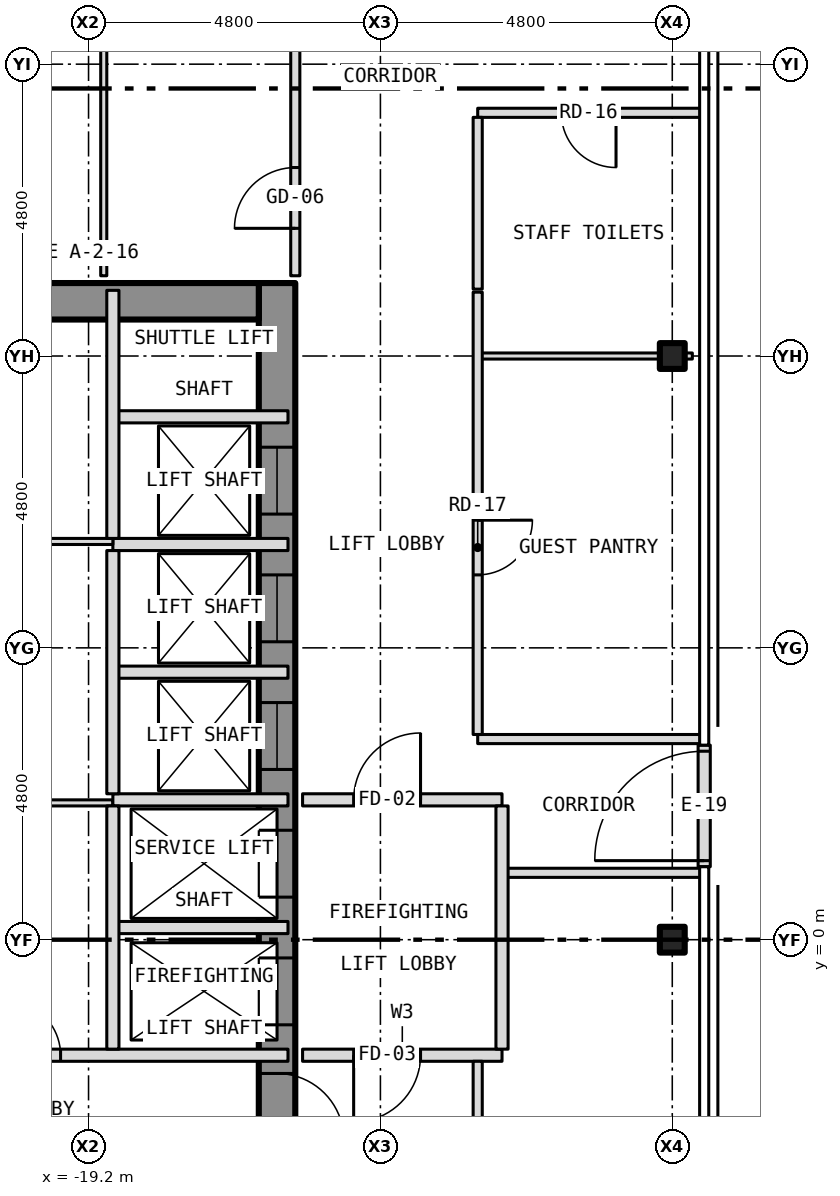
"""IFC4 building model, lengths in metres.
Left out: names, types, materials, properties, quantities, classifications, styles, units other than length and angle.
Written with IfcOpenShell. Run it as: python <this file> out.ifc"""

import sys

from ifc_helpers import new_model, si_unit, direction, frame, frame_2d, origin, origin_2d, place, context, subcontext, project, spatial, rectangle, i_section, extrude, element, fill, save


model = new_model("IFC4")
c1 = context("Model", 3, precision=1e-05, world=origin(), true_north=direction((0.0, 1.0)))
c2 = subcontext(c1, "Body", "Model", "MODEL_VIEW")
j1 = project(units=[si_unit("LENGTHUNIT", "METRE"), si_unit("PLANEANGLEUNIT", "RADIAN")], contexts=[c1])
p1 = place(None, origin())
s1 = spatial("IfcSite", under=j1, at=p1, CompositionType="ELEMENT")
p2 = place(p1, origin())
s2 = spatial("IfcBuilding", under=s1, at=p2, CompositionType="ELEMENT")
p3 = place(p2, frame((0.0, 0.0, 60.0)))
s3 = spatial("IfcBuildingStorey", under=s2, at=p3, CompositionType="ELEMENT", Elevation=60.0)
for number, where, z_axis, x_axis in (
    (1, (-9.6, 0.0, -0.15), (0.0, 0.0, 1.0), (1.0, 0.0, 0.0)),
    (2, (-9.6, 9.6, -0.15), (0.0, 0.0, 1.0), (1.0, 0.0, 0.0)),
):
    element("IfcColumn", number, at=place(p3, frame(where, z_axis=z_axis, x_axis=x_axis)), inside=s3, PredefinedType="COLUMN", context=c2, shape_type="SweptSolid", body=[
        extrude(i_section(OverallWidth=0.409, OverallDepth=0.424, WebThickness=0.033, FlangeThickness=0.052, at=origin_2d()), origin(), (0.0, 0.0, 1.0), 3.5),
    ])
p4 = place(p3, frame((-16.1, -10.8, 0.0), z_axis=(0.0, 0.0, 1.0), x_axis=(0.0, 1.0, 0.0)))
e3 = element("IfcWall", 3, at=p4, inside=s3, PredefinedType="SHEAR", context=c2, shape_type="SweptSolid", body=[
    extrude(rectangle(XDim=21.6, YDim=0.6, at=frame_2d((10.8, 0.0))), origin(), (0.0, 0.0, 1.0), 3.25),
])
p5 = place(p4, frame((9.4, 0.0, 0.0)))
e4 = element("IfcOpeningElement", 4, at=p5, cuts=e3, PredefinedType="OPENING", context=c2, shape_type="SweptSolid", body=[
    extrude(rectangle(XDim=1.1, YDim=2.1, at=frame_2d((0.55, 1.05))), frame((0.0, 0.312, 0.0), z_axis=(0.0, -1.0, 0.0), x_axis=(1.0, 0.0, 0.0)), (0.0, 0.0, 1.0), 0.624),
])
p6 = place(p4, frame((11.5, 0.0, 0.0)))
e5 = element("IfcOpeningElement", 5, at=p6, cuts=e3, PredefinedType="OPENING", context=c2, shape_type="SweptSolid", body=[
    extrude(rectangle(XDim=1.1, YDim=2.1, at=frame_2d((0.55, 1.05))), frame((0.0, 0.312, 0.0), z_axis=(0.0, -1.0, 0.0), x_axis=(1.0, 0.0, 0.0)), (0.0, 0.0, 1.0), 0.624),
])
p7 = place(p4, frame((13.6, 0.0, 0.0)))
e6 = element("IfcOpeningElement", 6, at=p7, cuts=e3, PredefinedType="OPENING", context=c2, shape_type="SweptSolid", body=[
    extrude(rectangle(XDim=1.1, YDim=2.1, at=frame_2d((0.55, 1.05))), frame((0.0, 0.312, 0.0), z_axis=(0.0, -1.0, 0.0), x_axis=(1.0, 0.0, 0.0)), (0.0, 0.0, 1.0), 0.624),
])
p8 = place(p4, frame((15.7, 0.0, 0.0)))
e7 = element("IfcOpeningElement", 7, at=p8, cuts=e3, PredefinedType="OPENING", context=c2, shape_type="SweptSolid", body=[
    extrude(rectangle(XDim=1.1, YDim=2.1, at=frame_2d((0.55, 1.05))), frame((0.0, 0.312, 0.0), z_axis=(0.0, -1.0, 0.0), x_axis=(1.0, 0.0, 0.0)), (0.0, 0.0, 1.0), 0.624),
])
p9 = place(p4, frame((17.8, 0.0, 0.0)))
e8 = element("IfcOpeningElement", 8, at=p9, cuts=e3, PredefinedType="OPENING", context=c2, shape_type="SweptSolid", body=[
    extrude(rectangle(XDim=1.1, YDim=2.1, at=frame_2d((0.55, 1.05))), frame((0.0, 0.312, 0.0), z_axis=(0.0, -1.0, 0.0), x_axis=(1.0, 0.0, 0.0)), (0.0, 0.0, 1.0), 0.624),
])
p10 = place(p4, frame((0.758, 0.0, 0.0)))
e9 = element("IfcOpeningElement", 9, at=p10, cuts=e3, PredefinedType="OPENING", context=c2, shape_type="SweptSolid", body=[
    extrude(rectangle(XDim=1.1, YDim=2.1, at=frame_2d((0.55, 1.05))), frame((0.0, 0.312, 0.0), z_axis=(0.0, -1.0, 0.0), x_axis=(1.0, 0.0, 0.0)), (0.0, 0.0, 1.0), 0.624),
])
p11 = place(p4, frame((7.5, 0.0, 0.0)))
e10 = element("IfcOpeningElement", 10, at=p11, cuts=e3, PredefinedType="OPENING", context=c2, shape_type="SweptSolid", body=[
    extrude(rectangle(XDim=1.1, YDim=2.1, at=frame_2d((0.55, 1.05))), frame((0.0, 0.312, 0.0), z_axis=(0.0, -1.0, 0.0), x_axis=(1.0, 0.0, 0.0)), (0.0, 0.0, 1.0), 0.624),
])
p12 = place(p3, frame((-23.4, 10.5, 0.0), z_axis=(0.0, 0.0, 1.0), x_axis=(1.0, 0.0, 0.0)))
e11 = element("IfcWall", 11, at=p12, inside=s3, PredefinedType="SHEAR", context=c2, shape_type="SweptSolid", body=[
    extrude(rectangle(XDim=7.0, YDim=0.6, at=frame_2d((3.5, 0.0))), origin(), (0.0, 0.0, 1.0), 3.25),
])
p13 = place(p3, frame((-9.075, 1.2, 0.0), z_axis=(0.0, 0.0, 1.0), x_axis=(0.0, 1.0, 0.0)))
e12 = element("IfcWall", 12, at=p13, inside=s3, PredefinedType="SOLIDWALL", context=c2, shape_type="SweptSolid", body=[
    extrude(rectangle(XDim=2.0, YDim=0.2, at=frame_2d((1.0, 0.0))), origin(), (0.0, 0.0, 1.0), 2.593),
])
p14 = place(p13, frame((0.1, 0.0, 0.0)))
e13 = element("IfcOpeningElement", 13, at=p14, cuts=e12, PredefinedType="OPENING", context=c2, shape_type="SweptSolid", body=[
    extrude(rectangle(XDim=1.8, YDim=2.1, at=frame_2d((0.9, 1.05))), frame((0.0, 0.112, 0.0), z_axis=(0.0, -1.0, 0.0), x_axis=(1.0, 0.0, 0.0)), (0.0, 0.0, 1.0), 0.224),
])
p15 = place(p3, frame((-23.88, -1.9, 0.0), z_axis=(0.0, 0.0, 1.0), x_axis=(1.0, 0.0, 0.0)))
e14 = element("IfcWall", 14, at=p15, inside=s3, PredefinedType="PARTITIONING", context=c2, shape_type="SweptSolid", body=[
    extrude(rectangle(XDim=7.96, YDim=0.2, at=frame_2d((3.98, 0.0))), origin(), (0.0, 0.0, 1.0), 3.25),
])
p16 = place(p15, frame((3.32, 0.0, 0.0)))
e15 = element("IfcOpeningElement", 15, at=p16, cuts=e14, PredefinedType="OPENING", context=c2, shape_type="SweptSolid", body=[
    extrude(rectangle(XDim=0.9, YDim=2.1, at=frame_2d((0.45, 1.05))), frame((0.0, 0.112, 0.0), z_axis=(0.0, -1.0, 0.0), x_axis=(1.0, 0.0, 0.0)), (0.0, 0.0, 1.0), 0.224),
])
p17 = place(p3, frame((-15.68, -1.9, 0.0), z_axis=(0.0, 0.0, 1.0), x_axis=(1.0, 0.0, 0.0)))
e16 = element("IfcWall", 16, at=p17, inside=s3, PredefinedType="PARTITIONING", context=c2, shape_type="SweptSolid", body=[
    extrude(rectangle(XDim=3.28, YDim=0.2, at=frame_2d((1.64, 0.0))), origin(), (0.0, 0.0, 1.0), 3.35),
])
p18 = place(p17, frame((0.84, 0.0, 0.0)))
e17 = element("IfcOpeningElement", 17, at=p18, cuts=e16, PredefinedType="OPENING", context=c2, shape_type="SweptSolid", body=[
    extrude(rectangle(XDim=1.1, YDim=2.1, at=frame_2d((0.55, 1.05))), frame((0.0, 0.112, 0.0), z_axis=(0.0, -1.0, 0.0), x_axis=(1.0, 0.0, 0.0)), (0.0, 0.0, 1.0), 0.224),
])
p19 = place(p3, frame((-18.8, 0.2, 0.0), z_axis=(0.0, 0.0, 1.0), x_axis=(1.0, 0.0, 0.0)))
e18 = element("IfcWall", 18, at=p19, inside=s3, PredefinedType="PARTITIONING", context=c2, shape_type="SweptSolid", body=[
    extrude(rectangle(XDim=2.88, YDim=0.2, at=frame_2d((1.44, 0.0))), origin(), (0.0, 0.0, 1.0), 3.25),
])
p20 = place(p3, frame((-12.4, 1.1, 0.0), z_axis=(0.0, 0.0, 1.0), x_axis=(1.0, 0.0, 0.0)))
e19 = element("IfcWall", 19, at=p20, inside=s3, PredefinedType="PARTITIONING", context=c2, shape_type="SweptSolid", body=[
    extrude(rectangle(XDim=3.28, YDim=0.15, at=frame_2d((1.64, 0.0))), origin(), (0.0, 0.0, 1.0), 3.35),
])
p21 = place(p3, frame((-23.88, 2.25, 0.0), z_axis=(0.0, 0.0, 1.0), x_axis=(1.0, 0.0, 0.0)))
e20 = element("IfcWall", 20, at=p21, inside=s3, PredefinedType="PARTITIONING", context=c2, shape_type="SweptSolid", body=[
    extrude(rectangle(XDim=5.08, YDim=0.1, at=frame_2d((2.54, 0.0))), origin(), (0.0, 0.0, 1.0), 3.25),
])
p22 = place(p21, frame((2.03, 0.0, 0.0)))
e21 = element("IfcOpeningElement", 21, at=p22, cuts=e20, PredefinedType="OPENING", context=c2, shape_type="SweptSolid", body=[
    extrude(rectangle(XDim=0.9, YDim=2.1, at=frame_2d((0.45, 1.05))), frame((0.0, 0.062, 0.0), z_axis=(0.0, -1.0, 0.0), x_axis=(1.0, 0.0, 0.0)), (0.0, 0.0, 1.0), 0.124),
])
p23 = place(p3, frame((-18.8, 2.3, 0.0), z_axis=(0.0, 0.0, 1.0), x_axis=(1.0, 0.0, 0.0)))
e22 = element("IfcWall", 22, at=p23, inside=s3, PredefinedType="PARTITIONING", context=c2, shape_type="SweptSolid", body=[
    extrude(rectangle(XDim=2.88, YDim=0.2, at=frame_2d((1.44, 0.0))), origin(), (0.0, 0.0, 1.0), 3.25),
])
p24 = place(p3, frame((-15.68, 2.3, 0.0), z_axis=(0.0, 0.0, 1.0), x_axis=(1.0, 0.0, 0.0)))
e23 = element("IfcWall", 23, at=p24, inside=s3, PredefinedType="PARTITIONING", context=c2, shape_type="SweptSolid", body=[
    extrude(rectangle(XDim=3.28, YDim=0.2, at=frame_2d((1.64, 0.0))), origin(), (0.0, 0.0, 1.0), 3.35),
])
p25 = place(p24, frame((0.84, 0.0, 0.0)))
e24 = element("IfcOpeningElement", 24, at=p25, cuts=e23, PredefinedType="OPENING", context=c2, shape_type="SweptSolid", body=[
    extrude(rectangle(XDim=1.1, YDim=2.1, at=frame_2d((0.55, 1.05))), frame((0.0, 0.112, 0.0), z_axis=(0.0, -1.0, 0.0), x_axis=(1.0, 0.0, 0.0)), (0.0, 0.0, 1.0), 0.224),
])
p26 = place(p3, frame((-12.8, 3.3, 0.0), z_axis=(0.0, 0.0, 1.0), x_axis=(1.0, 0.0, 0.0)))
e25 = element("IfcWall", 25, at=p26, inside=s3, PredefinedType="PARTITIONING", context=c2, shape_type="SweptSolid", body=[
    extrude(rectangle(XDim=3.68, YDim=0.15, at=frame_2d((1.84, 0.0))), origin(), (0.0, 0.0, 1.0), 3.35),
])
for number, where, z_axis, x_axis in (
    (26, (-18.8, 4.4, 0.0), (0.0, 0.0, 1.0), (1.0, 0.0, 0.0)),
    (27, (-18.8, 6.5, 0.0), (0.0, 0.0, 1.0), (1.0, 0.0, 0.0)),
):
    element("IfcWall", number, at=place(p3, frame(where, z_axis=z_axis, x_axis=x_axis)), inside=s3, PredefinedType="PARTITIONING", context=c2, shape_type="SweptSolid", body=[
        extrude(rectangle(XDim=2.88, YDim=0.2, at=frame_2d((1.44, 0.0))), origin(), (0.0, 0.0, 1.0), 3.25),
    ])
p27 = place(p3, frame((-23.88, 6.55, 0.0), z_axis=(0.0, 0.0, 1.0), x_axis=(1.0, 0.0, 0.0)))
e28 = element("IfcWall", 28, at=p27, inside=s3, PredefinedType="PARTITIONING", context=c2, shape_type="SweptSolid", body=[
    extrude(rectangle(XDim=5.08, YDim=0.1, at=frame_2d((2.54, 0.0))), origin(), (0.0, 0.0, 1.0), 3.25),
])
p28 = place(p27, frame((2.03, 0.0, 0.0)))
e29 = element("IfcOpeningElement", 29, at=p28, cuts=e28, PredefinedType="OPENING", context=c2, shape_type="SweptSolid", body=[
    extrude(rectangle(XDim=0.9, YDim=2.1, at=frame_2d((0.45, 1.05))), frame((0.0, 0.062, 0.0), z_axis=(0.0, -1.0, 0.0), x_axis=(1.0, 0.0, 0.0)), (0.0, 0.0, 1.0), 0.124),
])
p29 = place(p3, frame((-18.8, 8.6, 0.0), z_axis=(0.0, 0.0, 1.0), x_axis=(1.0, 0.0, 0.0)))
e30 = element("IfcWall", 30, at=p29, inside=s3, PredefinedType="PARTITIONING", context=c2, shape_type="SweptSolid", body=[
    extrude(rectangle(XDim=2.88, YDim=0.2, at=frame_2d((1.44, 0.0))), origin(), (0.0, 0.0, 1.0), 3.25),
])
p30 = place(p3, frame((-12.8, 9.6, 0.0), z_axis=(0.0, 0.0, 1.0), x_axis=(1.0, 0.0, 0.0)))
e31 = element("IfcWall", 31, at=p30, inside=s3, PredefinedType="PARTITIONING", context=c2, shape_type="SweptSolid", body=[
    extrude(rectangle(XDim=2.996, YDim=0.1, at=frame_2d((1.498, 0.0))), origin(), (0.0, 0.0, 1.0), 2.728),
])
p31 = place(p3, frame((-9.804, 9.6, 0.0), z_axis=(0.0, 0.0, 1.0), x_axis=(1.0, 0.0, 0.0)))
e32 = element("IfcWall", 32, at=p31, inside=s3, PredefinedType="PARTITIONING", context=c2, shape_type="SweptSolid", body=[
    extrude(rectangle(XDim=0.534, YDim=0.1, at=frame_2d((0.267, 0.0))), origin(), (0.0, 0.0, 1.0), 3.35),
])
p32 = place(p3, frame((-12.8, 13.6, 0.0), z_axis=(0.0, 0.0, 1.0), x_axis=(1.0, 0.0, 0.0)))
e33 = element("IfcWall", 33, at=p32, inside=s3, PredefinedType="PARTITIONING", context=c2, shape_type="SweptSolid", body=[
    extrude(rectangle(XDim=3.68, YDim=0.15, at=frame_2d((1.84, 0.0))), origin(), (0.0, 0.0, 1.0), 3.35),
])
p33 = place(p32, frame((1.375, 0.0, 0.0)))
e34 = element("IfcOpeningElement", 34, at=p33, cuts=e33, PredefinedType="OPENING", context=c2, shape_type="SweptSolid", body=[
    extrude(rectangle(XDim=0.9, YDim=2.1, at=frame_2d((0.45, 1.05))), frame((0.0, 0.087, 0.0), z_axis=(0.0, -1.0, 0.0), x_axis=(1.0, 0.0, 0.0)), (0.0, 0.0, 1.0), 0.174),
])
p34 = place(p3, frame((-18.95, 10.92, 0.0), z_axis=(0.0, 0.0, 1.0), x_axis=(0.0, 1.0, 0.0)))
e35 = element("IfcWall", 35, at=p34, inside=s3, PredefinedType="PARTITIONING", context=c2, shape_type="SweptSolid", body=[
    extrude(rectangle(XDim=13.61, YDim=0.1, at=frame_2d((6.805, 0.0))), origin(), (0.0, 0.0, 1.0), 3.35),
])
p35 = place(p34, frame((6.03, 0.0, 0.0)))
e36 = element("IfcOpeningElement", 36, at=p35, cuts=e35, PredefinedType="OPENING", context=c2, shape_type="SweptSolid", body=[
    extrude(rectangle(XDim=0.9, YDim=2.1, at=frame_2d((0.45, 1.05))), frame((0.0, 0.062, 0.0), z_axis=(0.0, -1.0, 0.0), x_axis=(1.0, 0.0, 0.0)), (0.0, 0.0, 1.0), 0.124),
])
for number, where, z_axis, x_axis in (
    (37, (-18.8, -1.8, 0.0), (0.0, 0.0, 1.0), (0.0, 1.0, 0.0)),
    (38, (-18.8, 2.4, 0.0), (0.0, 0.0, 1.0), (0.0, 1.0, 0.0)),
):
    element("IfcWall", number, at=place(p3, frame(where, z_axis=z_axis, x_axis=x_axis)), inside=s3, PredefinedType="PARTITIONING", context=c2, shape_type="SweptSolid", body=[
        extrude(rectangle(XDim=4.0, YDim=0.2, at=frame_2d((2.0, 0.0))), origin(), (0.0, 0.0, 1.0), 3.25),
    ])
p36 = place(p3, frame((-18.8, 6.6, 0.0), z_axis=(0.0, 0.0, 1.0), x_axis=(0.0, 1.0, 0.0)))
e39 = element("IfcWall", 39, at=p36, inside=s3, PredefinedType="PARTITIONING", context=c2, shape_type="SweptSolid", body=[
    extrude(rectangle(XDim=4.08, YDim=0.2, at=frame_2d((2.04, 0.0))), origin(), (0.0, 0.0, 1.0), 3.25),
])
p37 = place(p3, frame((-15.8, 10.92, 0.0), z_axis=(0.0, 0.0, 1.0), x_axis=(0.0, 1.0, 0.0)))
e40 = element("IfcWall", 40, at=p37, inside=s3, PredefinedType="PARTITIONING", context=c2, shape_type="SweptSolid", body=[
    extrude(rectangle(XDim=4.805, YDim=0.15, at=frame_2d((2.403, 0.0))), origin(), (0.0, 0.0, 1.0), 3.35),
])
p38 = place(p37, frame((0.78, 0.0, 0.0)))
e41 = element("IfcOpeningElement", 41, at=p38, cuts=e40, PredefinedType="OPENING", context=c2, shape_type="SweptSolid", body=[
    extrude(rectangle(XDim=1.0, YDim=2.1, at=frame_2d((0.5, 1.05))), frame((0.0, 0.087, 0.0), z_axis=(0.0, -1.0, 0.0), x_axis=(1.0, 0.0, 0.0)), (0.0, 0.0, 1.0), 0.174),
])
p39 = place(p3, frame((-12.8, -13.525, 0.0), z_axis=(0.0, 0.0, 1.0), x_axis=(0.0, 1.0, 0.0)))
e42 = element("IfcWall", 42, at=p39, inside=s3, PredefinedType="PARTITIONING", context=c2, shape_type="SweptSolid", body=[
    extrude(rectangle(XDim=11.525, YDim=0.15, at=frame_2d((5.762, 0.0))), origin(), (0.0, 0.0, 1.0), 3.35),
])
p40 = place(p39, frame((7.325, 0.0, 0.0)))
e43 = element("IfcOpeningElement", 43, at=p40, cuts=e42, PredefinedType="OPENING", context=c2, shape_type="SweptSolid", body=[
    extrude(rectangle(XDim=0.9, YDim=2.1, at=frame_2d((0.45, 1.05))), frame((0.0, 0.087, 0.0), z_axis=(0.0, -1.0, 0.0), x_axis=(1.0, 0.0, 0.0)), (0.0, 0.0, 1.0), 0.174),
])
p41 = place(p3, frame((-12.8, 3.375, 0.0), z_axis=(0.0, 0.0, 1.0), x_axis=(0.0, 1.0, 0.0)))
e44 = element("IfcWall", 44, at=p41, inside=s3, PredefinedType="PARTITIONING", context=c2, shape_type="SweptSolid", body=[
    extrude(rectangle(XDim=7.275, YDim=0.15, at=frame_2d((3.637, 0.0))), origin(), (0.0, 0.0, 1.0), 3.35),
])
p42 = place(p41, frame((2.625, 0.0, 0.0)))
e45 = element("IfcOpeningElement", 45, at=p42, cuts=e44, PredefinedType="OPENING", context=c2, shape_type="SweptSolid", body=[
    extrude(rectangle(XDim=0.9, YDim=2.1, at=frame_2d((0.45, 1.05))), frame((0.0, 0.087, 0.0), z_axis=(0.0, -1.0, 0.0), x_axis=(1.0, 0.0, 0.0)), (0.0, 0.0, 1.0), 0.174),
])
p43 = place(p3, frame((-12.8, 10.7, 0.0), z_axis=(0.0, 0.0, 1.0), x_axis=(0.0, 1.0, 0.0)))
e46 = element("IfcWall", 46, at=p43, inside=s3, PredefinedType="PARTITIONING", context=c2, shape_type="SweptSolid", body=[
    extrude(rectangle(XDim=2.825, YDim=0.15, at=frame_2d((1.413, 0.0))), origin(), (0.0, 0.0, 1.0), 3.35),
])
p44 = place(p3, frame((-12.4, -1.8, 0.0), z_axis=(0.0, 0.0, 1.0), x_axis=(0.0, 1.0, 0.0)))
e47 = element("IfcWall", 47, at=p44, inside=s3, PredefinedType="PARTITIONING", context=c2, shape_type="SweptSolid", body=[
    extrude(rectangle(XDim=4.0, YDim=0.2, at=frame_2d((2.0, 0.0))), origin(), (0.0, 0.0, 1.0), 3.35),
])
p45 = place(p14, origin())
e48 = element("IfcDoor", 48, at=p45, inside=s3, OperationType="DOUBLE_DOOR_DOUBLE_SWING", PredefinedType="DOOR", context=c2, shape_type="SweptSolid", body=[
    extrude(rectangle(XDim=1.8, YDim=2.1, at=frame_2d((0.9, 1.05))), frame((0.0, 0.025, 0.0), z_axis=(0.0, -1.0, 0.0), x_axis=(1.0, 0.0, 0.0)), (0.0, 0.0, 1.0), 0.05),
])
fill(e13, e48)
p46 = place(p5, origin())
e49 = element("IfcDoor", 49, at=p46, inside=s3, OperationType="SLIDING_TO_LEFT", PredefinedType="DOOR", context=c2, shape_type="SweptSolid", body=[
    extrude(rectangle(XDim=1.1, YDim=2.1, at=frame_2d((0.55, 1.05))), frame((0.0, 0.025, 0.0), z_axis=(0.0, -1.0, 0.0), x_axis=(1.0, 0.0, 0.0)), (0.0, 0.0, 1.0), 0.05),
])
fill(e4, e49)
p47 = place(p6, origin())
e50 = element("IfcDoor", 50, at=p47, inside=s3, OperationType="SLIDING_TO_LEFT", PredefinedType="DOOR", context=c2, shape_type="SweptSolid", body=[
    extrude(rectangle(XDim=1.1, YDim=2.1, at=frame_2d((0.55, 1.05))), frame((0.0, 0.025, 0.0), z_axis=(0.0, -1.0, 0.0), x_axis=(1.0, 0.0, 0.0)), (0.0, 0.0, 1.0), 0.05),
])
fill(e5, e50)
p48 = place(p7, origin())
e51 = element("IfcDoor", 51, at=p48, inside=s3, OperationType="SLIDING_TO_LEFT", PredefinedType="DOOR", context=c2, shape_type="SweptSolid", body=[
    extrude(rectangle(XDim=1.1, YDim=2.1, at=frame_2d((0.55, 1.05))), frame((0.0, 0.025, 0.0), z_axis=(0.0, -1.0, 0.0), x_axis=(1.0, 0.0, 0.0)), (0.0, 0.0, 1.0), 0.05),
])
fill(e6, e51)
p49 = place(p8, origin())
e52 = element("IfcDoor", 52, at=p49, inside=s3, OperationType="SLIDING_TO_LEFT", PredefinedType="DOOR", context=c2, shape_type="SweptSolid", body=[
    extrude(rectangle(XDim=1.1, YDim=2.1, at=frame_2d((0.55, 1.05))), frame((0.0, 0.025, 0.0), z_axis=(0.0, -1.0, 0.0), x_axis=(1.0, 0.0, 0.0)), (0.0, 0.0, 1.0), 0.05),
])
fill(e7, e52)
p50 = place(p9, origin())
e53 = element("IfcDoor", 53, at=p50, inside=s3, OperationType="SLIDING_TO_LEFT", PredefinedType="DOOR", context=c2, shape_type="SweptSolid", body=[
    extrude(rectangle(XDim=1.1, YDim=2.1, at=frame_2d((0.55, 1.05))), frame((0.0, 0.025, 0.0), z_axis=(0.0, -1.0, 0.0), x_axis=(1.0, 0.0, 0.0)), (0.0, 0.0, 1.0), 0.05),
])
fill(e8, e53)
p51 = place(p11, origin())
e54 = element("IfcDoor", 54, at=p51, inside=s3, OperationType="SINGLE_SWING_LEFT", PredefinedType="DOOR", context=c2, shape_type="SweptSolid", body=[
    extrude(rectangle(XDim=1.1, YDim=2.1, at=frame_2d((0.55, 1.05))), frame((0.0, 0.025, 0.0), z_axis=(0.0, -1.0, 0.0), x_axis=(1.0, 0.0, 0.0)), (0.0, 0.0, 1.0), 0.05),
])
fill(e10, e54)
p52 = place(p16, origin())
e55 = element("IfcDoor", 55, at=p52, inside=s3, OperationType="SINGLE_SWING_LEFT", PredefinedType="DOOR", context=c2, shape_type="SweptSolid", body=[
    extrude(rectangle(XDim=0.9, YDim=2.1, at=frame_2d((0.45, 1.05))), frame((0.0, 0.025, 0.0), z_axis=(0.0, -1.0, 0.0), x_axis=(1.0, 0.0, 0.0)), (0.0, 0.0, 1.0), 0.05),
])
fill(e15, e55)
p53 = place(p25, origin())
e56 = element("IfcDoor", 56, at=p53, inside=s3, OperationType="SINGLE_SWING_RIGHT", PredefinedType="DOOR", context=c2, shape_type="SweptSolid", body=[
    extrude(rectangle(XDim=1.1, YDim=2.1, at=frame_2d((0.55, 1.05))), frame((0.0, 0.025, 0.0), z_axis=(0.0, -1.0, 0.0), x_axis=(1.0, 0.0, 0.0)), (0.0, 0.0, 1.0), 0.05),
])
fill(e24, e56)
p54 = place(p18, origin())
e57 = element("IfcDoor", 57, at=p54, inside=s3, OperationType="SINGLE_SWING_LEFT", PredefinedType="DOOR", context=c2, shape_type="SweptSolid", body=[
    extrude(rectangle(XDim=1.1, YDim=2.1, at=frame_2d((0.55, 1.05))), frame((0.0, 0.025, 0.0), z_axis=(0.0, -1.0, 0.0), x_axis=(1.0, 0.0, 0.0)), (0.0, 0.0, 1.0), 0.05),
])
fill(e17, e57)
p55 = place(p38, origin())
e58 = element("IfcDoor", 58, at=p55, inside=s3, OperationType="SINGLE_SWING_LEFT", PredefinedType="DOOR", context=c2, shape_type="SweptSolid", body=[
    extrude(rectangle(XDim=1.0, YDim=2.1, at=frame_2d((0.5, 1.05))), frame((0.0, 0.025, 0.0), z_axis=(0.0, -1.0, 0.0), x_axis=(1.0, 0.0, 0.0)), (0.0, 0.0, 1.0), 0.05),
])
fill(e41, e58)
p56 = place(p33, origin())
e59 = element("IfcDoor", 59, at=p56, inside=s3, OperationType="SINGLE_SWING_RIGHT", PredefinedType="DOOR", context=c2, shape_type="SweptSolid", body=[
    extrude(rectangle(XDim=0.9, YDim=2.1, at=frame_2d((0.45, 1.05))), frame((0.0, 0.025, 0.0), z_axis=(0.0, -1.0, 0.0), x_axis=(1.0, 0.0, 0.0)), (0.0, 0.0, 1.0), 0.05),
])
fill(e34, e59)
p57 = place(p42, origin())
e60 = element("IfcDoor", 60, at=p57, inside=s3, OperationType="SINGLE_SWING_RIGHT", PredefinedType="DOOR", context=c2, shape_type="SweptSolid", body=[
    extrude(rectangle(XDim=0.9, YDim=2.1, at=frame_2d((0.45, 1.05))), frame((0.0, 0.025, 0.0), z_axis=(0.0, -1.0, 0.0), x_axis=(1.0, 0.0, 0.0)), (0.0, 0.0, 1.0), 0.05),
])
fill(e45, e60)
save(model, sys.argv[1])
